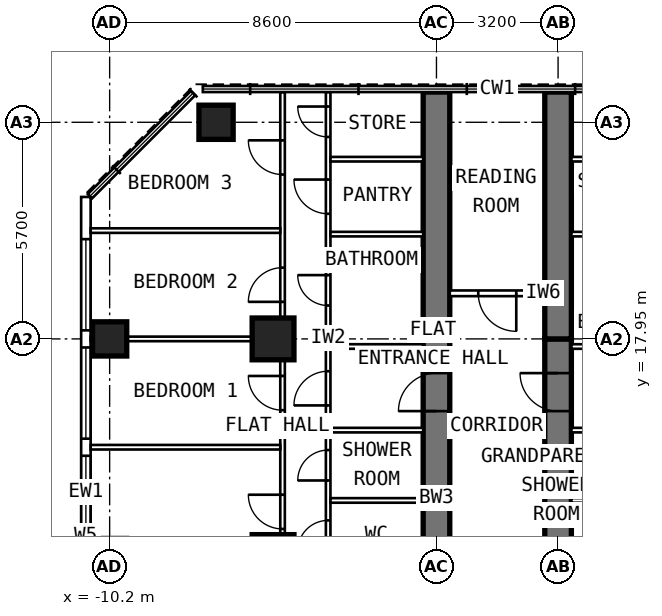
"""IFC4 building model, lengths in metres.
Left out: names, types, materials, properties, quantities, classifications, styles, units other than length and angle.
Written with IfcOpenShell. Run it as: python <this file> out.ifc"""

import sys

from ifc_helpers import new_model, si_unit, direction, frame, frame_2d, origin, origin_2d, place, context, subcontext, project, spatial, rectangle, extrude, element, fill, save


model = new_model("IFC4")
c1 = context("Model", 3, precision=1e-05, world=origin(), true_north=direction((0.0, 1.0)))
c2 = subcontext(c1, "Body", "Model", "MODEL_VIEW")
j1 = project(units=[si_unit("LENGTHUNIT", "METRE"), si_unit("PLANEANGLEUNIT", "RADIAN")], contexts=[c1])
p1 = place(None, origin())
s1 = spatial("IfcSite", under=j1, at=p1, CompositionType="ELEMENT")
p2 = place(p1, origin())
s2 = spatial("IfcBuilding", under=s1, at=p2, CompositionType="ELEMENT")
p3 = place(p2, frame((0.0, 0.0, 201.0)))
s3 = spatial("IfcBuildingStorey", under=s2, at=p3, CompositionType="ELEMENT", Elevation=201.0)
for number, where, z_axis, x_axis in (
    (1, (-10.2, 17.95, 0.0), (0.0, 0.0, 1.0), (0.0, 1.0, 0.0)),
    (2, (-7.4, 23.65, 0.0), (0.0, 0.0, 1.0), (0.0, 1.0, 0.0)),
):
    element("IfcColumn", number, at=place(p3, frame(where, z_axis=z_axis, x_axis=x_axis)), inside=s3, PredefinedType="COLUMN", context=c2, shape_type="SweptSolid", body=[
        extrude(rectangle(XDim=0.9, YDim=0.9, at=origin_2d()), origin(), (0.0, 0.0, 1.0), 3.6),
    ])
for number, where, z_axis, x_axis in (
    (3, (-5.9, 12.25, 0.0), (0.0, 0.0, 1.0), (0.0, 1.0, 0.0)),
    (4, (-5.9, 17.95, 0.0), (0.0, 0.0, 1.0), (0.0, 1.0, 0.0)),
):
    element("IfcColumn", number, at=place(p3, frame(where, z_axis=z_axis, x_axis=x_axis)), inside=s3, PredefinedType="COLUMN", context=c2, shape_type="SweptSolid", body=[
        extrude(rectangle(XDim=1.1, YDim=1.1, at=origin_2d()), origin(), (0.0, 0.0, 1.0), 3.6),
    ])
p4 = place(p3, frame((-1.6, 9.6, 0.0), z_axis=(0.0, 0.0, 1.0), x_axis=(0.0, 1.0, 0.0)))
e5 = element("IfcWall", 5, at=p4, inside=s3, PredefinedType="SHEAR", context=c2, shape_type="SweptSolid", body=[
    extrude(rectangle(XDim=8.35, YDim=0.7, at=frame_2d((4.175, 0.0))), origin(), (0.0, 0.0, 1.0), 3.6),
])
p5 = place(p4, frame((6.45, 0.0, 0.0)))
e6 = element("IfcOpeningElement", 6, at=p5, cuts=e5, PredefinedType="OPENING", context=c2, shape_type="SweptSolid", body=[
    extrude(rectangle(XDim=1.0, YDim=2.1, at=frame_2d((0.5, 1.05))), frame((0.0, 0.362, 0.0), z_axis=(0.0, -1.0, 0.0), x_axis=(1.0, 0.0, 0.0)), (0.0, 0.0, 1.0), 0.724),
])
p6 = place(p3, frame((-1.6, 17.95, 0.0), z_axis=(0.0, 0.0, 1.0), x_axis=(0.0, 1.0, 0.0)))
e7 = element("IfcWall", 7, at=p6, inside=s3, PredefinedType="SHEAR", context=c2, shape_type="SweptSolid", body=[
    extrude(rectangle(XDim=6.495, YDim=0.7, at=frame_2d((3.248, 0.0))), origin(), (0.0, 0.0, 1.0), 3.6),
])
p7 = place(p3, frame((1.6, 9.6, 0.0), z_axis=(0.0, 0.0, 1.0), x_axis=(0.0, 1.0, 0.0)))
e8 = element("IfcWall", 8, at=p7, inside=s3, PredefinedType="SHEAR", context=c2, shape_type="SweptSolid", body=[
    extrude(rectangle(XDim=8.35, YDim=0.7, at=frame_2d((4.175, 0.0))), origin(), (0.0, 0.0, 1.0), 3.6),
])
p8 = place(p7, frame((6.45, 0.0, 0.0)))
e9 = element("IfcOpeningElement", 9, at=p8, cuts=e8, PredefinedType="OPENING", context=c2, shape_type="SweptSolid", body=[
    extrude(rectangle(XDim=1.0, YDim=2.1, at=frame_2d((0.5, 1.05))), frame((0.0, 0.362, 0.0), z_axis=(0.0, -1.0, 0.0), x_axis=(1.0, 0.0, 0.0)), (0.0, 0.0, 1.0), 0.724),
])
p9 = place(p3, frame((1.6, 17.95, 0.0), z_axis=(0.0, 0.0, 1.0), x_axis=(0.0, 1.0, 0.0)))
e10 = element("IfcWall", 10, at=p9, inside=s3, PredefinedType="SHEAR", context=c2, shape_type="SweptSolid", body=[
    extrude(rectangle(XDim=6.495, YDim=0.7, at=frame_2d((3.248, 0.0))), origin(), (0.0, 0.0, 1.0), 3.6),
])
p10 = place(p3, frame((-10.825, 6.148, 0.0), z_axis=(0.0, 0.0, 1.0), x_axis=(0.0, 1.0, 0.0)))
e11 = element("IfcWall", 11, at=p10, inside=s3, PredefinedType="SOLIDWALL", context=c2, shape_type="SweptSolid", body=[
    extrude(rectangle(XDim=15.537, YDim=0.25, at=frame_2d((7.769, 0.0))), origin(), (0.0, 0.0, 1.0), 3.35),
])
p11 = place(p10, frame((0.627, 0.0, 0.8)))
e12 = element("IfcOpeningElement", 12, at=p11, cuts=e11, PredefinedType="OPENING", context=c2, shape_type="SweptSolid", body=[
    extrude(rectangle(XDim=2.4, YDim=1.8, at=frame_2d((1.2, 0.9))), frame((0.0, 0.137, 0.0), z_axis=(0.0, -1.0, 0.0), x_axis=(1.0, 0.0, 0.0)), (0.0, 0.0, 1.0), 0.274),
])
p12 = place(p10, frame((3.477, 0.0, 0.8)))
e13 = element("IfcOpeningElement", 13, at=p12, cuts=e11, PredefinedType="OPENING", context=c2, shape_type="SweptSolid", body=[
    extrude(rectangle(XDim=2.4, YDim=1.8, at=frame_2d((1.2, 0.9))), frame((0.0, 0.137, 0.0), z_axis=(0.0, -1.0, 0.0), x_axis=(1.0, 0.0, 0.0)), (0.0, 0.0, 1.0), 0.274),
])
p13 = place(p10, frame((6.327, 0.0, 0.8)))
e14 = element("IfcOpeningElement", 14, at=p13, cuts=e11, PredefinedType="OPENING", context=c2, shape_type="SweptSolid", body=[
    extrude(rectangle(XDim=2.4, YDim=1.8, at=frame_2d((1.2, 0.9))), frame((0.0, 0.137, 0.0), z_axis=(0.0, -1.0, 0.0), x_axis=(1.0, 0.0, 0.0)), (0.0, 0.0, 1.0), 0.274),
])
p14 = place(p10, frame((9.177, 0.0, 0.8)))
e15 = element("IfcOpeningElement", 15, at=p14, cuts=e11, PredefinedType="OPENING", context=c2, shape_type="SweptSolid", body=[
    extrude(rectangle(XDim=2.4, YDim=1.8, at=frame_2d((1.2, 0.9))), frame((0.0, 0.137, 0.0), z_axis=(0.0, -1.0, 0.0), x_axis=(1.0, 0.0, 0.0)), (0.0, 0.0, 1.0), 0.274),
])
p15 = place(p10, frame((12.027, 0.0, 0.8)))
e16 = element("IfcOpeningElement", 16, at=p15, cuts=e11, PredefinedType="OPENING", context=c2, shape_type="SweptSolid", body=[
    extrude(rectangle(XDim=2.4, YDim=1.8, at=frame_2d((1.2, 0.9))), frame((0.0, 0.137, 0.0), z_axis=(0.0, -1.0, 0.0), x_axis=(1.0, 0.0, 0.0)), (0.0, 0.0, 1.0), 0.274),
])
p16 = place(p3, frame((-4.45, 9.925, 0.0), z_axis=(0.0, 0.0, 1.0), x_axis=(0.0, 1.0, 0.0)))
e17 = element("IfcWall", 17, at=p16, inside=s3, PredefinedType="PARTITIONING", context=c2, shape_type="SweptSolid", body=[
    extrude(rectangle(XDim=14.52, YDim=0.12, at=frame_2d((7.26, 0.0))), origin(), (0.0, 0.0, 1.0), 3.35),
])
p17 = place(p16, frame((0.55, 0.0, 0.0)))
e18 = element("IfcOpeningElement", 18, at=p17, cuts=e17, PredefinedType="OPENING", context=c2, shape_type="SweptSolid", body=[
    extrude(rectangle(XDim=0.9, YDim=2.1, at=frame_2d((0.45, 1.05))), frame((0.0, 0.072, 0.0), z_axis=(0.0, -1.0, 0.0), x_axis=(1.0, 0.0, 0.0)), (0.0, 0.0, 1.0), 0.144),
])
p18 = place(p16, frame((2.45, 0.0, 0.0)))
e19 = element("IfcOpeningElement", 19, at=p18, cuts=e17, PredefinedType="OPENING", context=c2, shape_type="SweptSolid", body=[
    extrude(rectangle(XDim=0.8, YDim=2.1, at=frame_2d((0.4, 1.05))), frame((0.0, 0.072, 0.0), z_axis=(0.0, -1.0, 0.0), x_axis=(1.0, 0.0, 0.0)), (0.0, 0.0, 1.0), 0.144),
])
p19 = place(p16, frame((4.3, 0.0, 0.0)))
e20 = element("IfcOpeningElement", 20, at=p19, cuts=e17, PredefinedType="OPENING", context=c2, shape_type="SweptSolid", body=[
    extrude(rectangle(XDim=0.8, YDim=2.1, at=frame_2d((0.4, 1.05))), frame((0.0, 0.072, 0.0), z_axis=(0.0, -1.0, 0.0), x_axis=(1.0, 0.0, 0.0)), (0.0, 0.0, 1.0), 0.144),
])
p20 = place(p16, frame((6.275, 0.0, 0.0)))
e21 = element("IfcOpeningElement", 21, at=p20, cuts=e17, PredefinedType="OPENING", context=c2, shape_type="SweptSolid", body=[
    extrude(rectangle(XDim=0.9, YDim=2.1, at=frame_2d((0.45, 1.05))), frame((0.0, 0.072, 0.0), z_axis=(0.0, -1.0, 0.0), x_axis=(1.0, 0.0, 0.0)), (0.0, 0.0, 1.0), 0.144),
])
p21 = place(p16, frame((8.904, 0.0, 0.0)))
e22 = element("IfcOpeningElement", 22, at=p21, cuts=e17, PredefinedType="OPENING", context=c2, shape_type="SweptSolid", body=[
    extrude(rectangle(XDim=0.8, YDim=2.1, at=frame_2d((0.4, 1.05))), frame((0.0, 0.072, 0.0), z_axis=(0.0, -1.0, 0.0), x_axis=(1.0, 0.0, 0.0)), (0.0, 0.0, 1.0), 0.144),
])
p22 = place(p16, frame((11.318, 0.0, 0.0)))
e23 = element("IfcOpeningElement", 23, at=p22, cuts=e17, PredefinedType="OPENING", context=c2, shape_type="SweptSolid", body=[
    extrude(rectangle(XDim=0.9, YDim=2.1, at=frame_2d((0.45, 1.05))), frame((0.0, 0.072, 0.0), z_axis=(0.0, -1.0, 0.0), x_axis=(1.0, 0.0, 0.0)), (0.0, 0.0, 1.0), 0.144),
])
p23 = place(p16, frame((13.339, 0.0, 0.0)))
e24 = element("IfcOpeningElement", 24, at=p23, cuts=e17, PredefinedType="OPENING", context=c2, shape_type="SweptSolid", body=[
    extrude(rectangle(XDim=0.8, YDim=2.1, at=frame_2d((0.4, 1.05))), frame((0.0, 0.072, 0.0), z_axis=(0.0, -1.0, 0.0), x_axis=(1.0, 0.0, 0.0)), (0.0, 0.0, 1.0), 0.144),
])
p24 = place(p3, frame((-5.65, 9.6, 0.0), z_axis=(0.0, 0.0, 1.0), x_axis=(0.0, 1.0, 0.0)))
e25 = element("IfcWall", 25, at=p24, inside=s3, PredefinedType="PARTITIONING", context=c2, shape_type="SweptSolid", body=[
    extrude(rectangle(XDim=14.845, YDim=0.12, at=frame_2d((7.422, 0.0))), origin(), (0.0, 0.0, 1.0), 3.35),
])
p25 = place(p24, frame((3.35, 0.0, 0.0)))
e26 = element("IfcOpeningElement", 26, at=p25, cuts=e25, PredefinedType="OPENING", context=c2, shape_type="SweptSolid", body=[
    extrude(rectangle(XDim=0.9, YDim=2.1, at=frame_2d((0.45, 1.05))), frame((0.0, 0.072, 0.0), z_axis=(0.0, -1.0, 0.0), x_axis=(1.0, 0.0, 0.0)), (0.0, 0.0, 1.0), 0.144),
])
p26 = place(p24, frame((6.475, 0.0, 0.0)))
e27 = element("IfcOpeningElement", 27, at=p26, cuts=e25, PredefinedType="OPENING", context=c2, shape_type="SweptSolid", body=[
    extrude(rectangle(XDim=0.9, YDim=2.1, at=frame_2d((0.45, 1.05))), frame((0.0, 0.072, 0.0), z_axis=(0.0, -1.0, 0.0), x_axis=(1.0, 0.0, 0.0)), (0.0, 0.0, 1.0), 0.144),
])
p27 = place(p24, frame((9.325, 0.0, 0.0)))
e28 = element("IfcOpeningElement", 28, at=p27, cuts=e25, PredefinedType="OPENING", context=c2, shape_type="SweptSolid", body=[
    extrude(rectangle(XDim=0.9, YDim=2.1, at=frame_2d((0.45, 1.05))), frame((0.0, 0.072, 0.0), z_axis=(0.0, -1.0, 0.0), x_axis=(1.0, 0.0, 0.0)), (0.0, 0.0, 1.0), 0.144),
])
p28 = place(p24, frame((12.675, 0.0, 0.0)))
e29 = element("IfcOpeningElement", 29, at=p28, cuts=e25, PredefinedType="OPENING", context=c2, shape_type="SweptSolid", body=[
    extrude(rectangle(XDim=0.9, YDim=2.1, at=frame_2d((0.45, 1.05))), frame((0.0, 0.072, 0.0), z_axis=(0.0, -1.0, 0.0), x_axis=(1.0, 0.0, 0.0)), (0.0, 0.0, 1.0), 0.144),
])
p29 = place(p3, frame((-5.71, 15.1, 0.0), z_axis=(0.0, 0.0, 1.0), x_axis=(-1.0, 0.0, 0.0)))
e30 = element("IfcWall", 30, at=p29, inside=s3, PredefinedType="PARTITIONING", context=c2, shape_type="SweptSolid", body=[
    extrude(rectangle(XDim=4.99, YDim=0.12, at=frame_2d((2.495, 0.0))), origin(), (0.0, 0.0, 1.0), 3.35),
])
p30 = place(p3, frame((-5.71, 17.95, 0.0), z_axis=(0.0, 0.0, 1.0), x_axis=(-1.0, 0.0, 0.0)))
e31 = element("IfcWall", 31, at=p30, inside=s3, PredefinedType="PARTITIONING", context=c2, shape_type="SweptSolid", body=[
    extrude(rectangle(XDim=4.99, YDim=0.12, at=frame_2d((2.495, 0.0))), origin(), (0.0, 0.0, 1.0), 2.45),
])
p31 = place(p3, frame((-5.71, 20.8, 0.0), z_axis=(0.0, 0.0, 1.0), x_axis=(-1.0, 0.0, 0.0)))
e32 = element("IfcWall", 32, at=p31, inside=s3, PredefinedType="PARTITIONING", context=c2, shape_type="SweptSolid", body=[
    extrude(rectangle(XDim=4.99, YDim=0.12, at=frame_2d((2.495, 0.0))), origin(), (0.0, 0.0, 1.0), 3.35),
])
for number, where, z_axis, x_axis in (
    (33, (-1.95, 13.7, 0.0), (0.0, 0.0, 1.0), (-1.0, 0.0, 0.0)),
    (34, (-1.95, 15.55, 0.0), (0.0, 0.0, 1.0), (-1.0, 0.0, 0.0)),
):
    element("IfcWall", number, at=place(p3, frame(where, z_axis=z_axis, x_axis=x_axis)), inside=s3, PredefinedType="PARTITIONING", context=c2, shape_type="SweptSolid", body=[
        extrude(rectangle(XDim=2.44, YDim=0.12, at=frame_2d((1.22, 0.0))), origin(), (0.0, 0.0, 1.0), 3.35),
    ])
p32 = place(p3, frame((-1.95, 17.75, 0.0), z_axis=(0.0, 0.0, 1.0), x_axis=(-1.0, 0.0, 0.0)))
e35 = element("IfcWall", 35, at=p32, inside=s3, PredefinedType="PARTITIONING", context=c2, shape_type="SweptSolid", body=[
    extrude(rectangle(XDim=2.44, YDim=0.12, at=frame_2d((1.22, 0.0))), origin(), (0.0, 0.0, 1.0), 2.45),
])
for number, where, z_axis, x_axis in (
    (36, (-1.95, 20.707, 0.0), (0.0, 0.0, 1.0), (-1.0, 0.0, 0.0)),
    (37, (-1.95, 22.678, 0.0), (0.0, 0.0, 1.0), (-1.0, 0.0, 0.0)),
    (38, (1.95, 13.7, 0.0), (0.0, 0.0, 1.0), (1.0, 0.0, 0.0)),
    (39, (1.95, 15.55, 0.0), (0.0, 0.0, 1.0), (1.0, 0.0, 0.0)),
):
    element("IfcWall", number, at=place(p3, frame(where, z_axis=z_axis, x_axis=x_axis)), inside=s3, PredefinedType="PARTITIONING", context=c2, shape_type="SweptSolid", body=[
        extrude(rectangle(XDim=2.44, YDim=0.12, at=frame_2d((1.22, 0.0))), origin(), (0.0, 0.0, 1.0), 3.35),
    ])
p33 = place(p3, frame((1.95, 17.75, 0.0), z_axis=(0.0, 0.0, 1.0), x_axis=(1.0, 0.0, 0.0)))
e40 = element("IfcWall", 40, at=p33, inside=s3, PredefinedType="PARTITIONING", context=c2, shape_type="SweptSolid", body=[
    extrude(rectangle(XDim=2.44, YDim=0.12, at=frame_2d((1.22, 0.0))), origin(), (0.0, 0.0, 1.0), 2.45),
])
for number, where, z_axis, x_axis in (
    (41, (1.95, 20.707, 0.0), (0.0, 0.0, 1.0), (1.0, 0.0, 0.0)),
    (42, (1.95, 22.678, 0.0), (0.0, 0.0, 1.0), (1.0, 0.0, 0.0)),
):
    element("IfcWall", number, at=place(p3, frame(where, z_axis=z_axis, x_axis=x_axis)), inside=s3, PredefinedType="PARTITIONING", context=c2, shape_type="SweptSolid", body=[
        extrude(rectangle(XDim=2.44, YDim=0.12, at=frame_2d((1.22, 0.0))), origin(), (0.0, 0.0, 1.0), 3.35),
    ])
p34 = place(p3, frame((1.25, 19.15, 0.0), z_axis=(0.0, 0.0, 1.0), x_axis=(-1.0, 0.0, 0.0)))
e43 = element("IfcWall", 43, at=p34, inside=s3, PredefinedType="PARTITIONING", context=c2, shape_type="SweptSolid", body=[
    extrude(rectangle(XDim=2.5, YDim=0.15, at=frame_2d((1.25, 0.0))), origin(), (0.0, 0.0, 1.0), 3.35),
])
p35 = place(p34, frame((0.75, 0.0, 0.0)))
e44 = element("IfcOpeningElement", 44, at=p35, cuts=e43, PredefinedType="OPENING", context=c2, shape_type="SweptSolid", body=[
    extrude(rectangle(XDim=1.0, YDim=2.1, at=frame_2d((0.5, 1.05))), frame((0.0, 0.087, 0.0), z_axis=(0.0, -1.0, 0.0), x_axis=(1.0, 0.0, 0.0)), (0.0, 0.0, 1.0), 0.174),
])
p36 = place(p13, origin())
e45 = element("IfcWindow", 45, at=p36, inside=s3, PartitioningType="SINGLE_PANEL", PredefinedType="WINDOW", context=c2, shape_type="SweptSolid", body=[
    extrude(rectangle(XDim=2.4, YDim=1.8, at=frame_2d((1.2, 0.9))), frame((0.0, 0.03, 0.0), z_axis=(0.0, -1.0, 0.0), x_axis=(1.0, 0.0, 0.0)), (0.0, 0.0, 1.0), 0.06),
])
fill(e14, e45)
p37 = place(p14, origin())
e46 = element("IfcWindow", 46, at=p37, inside=s3, PartitioningType="SINGLE_PANEL", PredefinedType="WINDOW", context=c2, shape_type="SweptSolid", body=[
    extrude(rectangle(XDim=2.4, YDim=1.8, at=frame_2d((1.2, 0.9))), frame((0.0, 0.03, 0.0), z_axis=(0.0, -1.0, 0.0), x_axis=(1.0, 0.0, 0.0)), (0.0, 0.0, 1.0), 0.06),
])
fill(e15, e46)
p38 = place(p15, origin())
e47 = element("IfcWindow", 47, at=p38, inside=s3, PartitioningType="SINGLE_PANEL", PredefinedType="WINDOW", context=c2, shape_type="SweptSolid", body=[
    extrude(rectangle(XDim=2.4, YDim=1.8, at=frame_2d((1.2, 0.9))), frame((0.0, 0.03, 0.0), z_axis=(0.0, -1.0, 0.0), x_axis=(1.0, 0.0, 0.0)), (0.0, 0.0, 1.0), 0.06),
])
fill(e16, e47)
p39 = place(p5, origin())
e48 = element("IfcDoor", 48, at=p39, inside=s3, OperationType="SINGLE_SWING_LEFT", PredefinedType="DOOR", context=c2, shape_type="SweptSolid", body=[
    extrude(rectangle(XDim=1.0, YDim=2.1, at=frame_2d((0.5, 1.05))), frame((0.0, 0.1, 0.0), z_axis=(0.0, -1.0, 0.0), x_axis=(1.0, 0.0, 0.0)), (0.0, 0.0, 1.0), 0.2),
])
fill(e6, e48)
p40 = place(p25, origin())
e49 = element("IfcDoor", 49, at=p40, inside=s3, OperationType="SINGLE_SWING_RIGHT", PredefinedType="DOOR", context=c2, shape_type="SweptSolid", body=[
    extrude(rectangle(XDim=0.9, YDim=2.1, at=frame_2d((0.45, 1.05))), frame((0.0, 0.025, 0.0), z_axis=(0.0, -1.0, 0.0), x_axis=(1.0, 0.0, 0.0)), (0.0, 0.0, 1.0), 0.05),
])
fill(e26, e49)
p41 = place(p26, origin())
e50 = element("IfcDoor", 50, at=p41, inside=s3, OperationType="SINGLE_SWING_RIGHT", PredefinedType="DOOR", context=c2, shape_type="SweptSolid", body=[
    extrude(rectangle(XDim=0.9, YDim=2.1, at=frame_2d((0.45, 1.05))), frame((0.0, 0.025, 0.0), z_axis=(0.0, -1.0, 0.0), x_axis=(1.0, 0.0, 0.0)), (0.0, 0.0, 1.0), 0.05),
])
fill(e27, e50)
p42 = place(p27, origin())
e51 = element("IfcDoor", 51, at=p42, inside=s3, OperationType="SINGLE_SWING_LEFT", PredefinedType="DOOR", context=c2, shape_type="SweptSolid", body=[
    extrude(rectangle(XDim=0.9, YDim=2.1, at=frame_2d((0.45, 1.05))), frame((0.0, 0.025, 0.0), z_axis=(0.0, -1.0, 0.0), x_axis=(1.0, 0.0, 0.0)), (0.0, 0.0, 1.0), 0.05),
])
fill(e28, e51)
p43 = place(p28, origin())
e52 = element("IfcDoor", 52, at=p43, inside=s3, OperationType="SINGLE_SWING_RIGHT", PredefinedType="DOOR", context=c2, shape_type="SweptSolid", body=[
    extrude(rectangle(XDim=0.9, YDim=2.1, at=frame_2d((0.45, 1.05))), frame((0.0, 0.025, 0.0), z_axis=(0.0, -1.0, 0.0), x_axis=(1.0, 0.0, 0.0)), (0.0, 0.0, 1.0), 0.05),
])
fill(e29, e52)
p44 = place(p18, origin())
e53 = element("IfcDoor", 53, at=p44, inside=s3, OperationType="SINGLE_SWING_LEFT", PredefinedType="DOOR", context=c2, shape_type="SweptSolid", body=[
    extrude(rectangle(XDim=0.8, YDim=2.1, at=frame_2d((0.4, 1.05))), frame((0.0, 0.025, 0.0), z_axis=(0.0, -1.0, 0.0), x_axis=(1.0, 0.0, 0.0)), (0.0, 0.0, 1.0), 0.05),
])
fill(e19, e53)
p45 = place(p19, origin())
e54 = element("IfcDoor", 54, at=p45, inside=s3, OperationType="SINGLE_SWING_LEFT", PredefinedType="DOOR", context=c2, shape_type="SweptSolid", body=[
    extrude(rectangle(XDim=0.8, YDim=2.1, at=frame_2d((0.4, 1.05))), frame((0.0, 0.025, 0.0), z_axis=(0.0, -1.0, 0.0), x_axis=(1.0, 0.0, 0.0)), (0.0, 0.0, 1.0), 0.05),
])
fill(e20, e54)
p46 = place(p20, origin())
e55 = element("IfcDoor", 55, at=p46, inside=s3, OperationType="SINGLE_SWING_LEFT", PredefinedType="DOOR", context=c2, shape_type="SweptSolid", body=[
    extrude(rectangle(XDim=0.9, YDim=2.1, at=frame_2d((0.45, 1.05))), frame((0.0, 0.025, 0.0), z_axis=(0.0, -1.0, 0.0), x_axis=(1.0, 0.0, 0.0)), (0.0, 0.0, 1.0), 0.05),
])
fill(e21, e55)
p47 = place(p21, origin())
e56 = element("IfcDoor", 56, at=p47, inside=s3, OperationType="SINGLE_SWING_RIGHT", PredefinedType="DOOR", context=c2, shape_type="SweptSolid", body=[
    extrude(rectangle(XDim=0.8, YDim=2.1, at=frame_2d((0.4, 1.05))), frame((0.0, 0.025, 0.0), z_axis=(0.0, -1.0, 0.0), x_axis=(1.0, 0.0, 0.0)), (0.0, 0.0, 1.0), 0.05),
])
fill(e22, e56)
p48 = place(p22, origin())
e57 = element("IfcDoor", 57, at=p48, inside=s3, OperationType="SINGLE_SWING_RIGHT", PredefinedType="DOOR", context=c2, shape_type="SweptSolid", body=[
    extrude(rectangle(XDim=0.9, YDim=2.1, at=frame_2d((0.45, 1.05))), frame((0.0, 0.025, 0.0), z_axis=(0.0, -1.0, 0.0), x_axis=(1.0, 0.0, 0.0)), (0.0, 0.0, 1.0), 0.05),
])
fill(e23, e57)
p49 = place(p23, origin())
e58 = element("IfcDoor", 58, at=p49, inside=s3, OperationType="SINGLE_SWING_RIGHT", PredefinedType="DOOR", context=c2, shape_type="SweptSolid", body=[
    extrude(rectangle(XDim=0.8, YDim=2.1, at=frame_2d((0.4, 1.05))), frame((0.0, 0.025, 0.0), z_axis=(0.0, -1.0, 0.0), x_axis=(1.0, 0.0, 0.0)), (0.0, 0.0, 1.0), 0.05),
])
fill(e24, e58)
p50 = place(p8, origin())
e59 = element("IfcDoor", 59, at=p50, inside=s3, OperationType="SINGLE_SWING_RIGHT", PredefinedType="DOOR", context=c2, shape_type="SweptSolid", body=[
    extrude(rectangle(XDim=1.0, YDim=2.1, at=frame_2d((0.5, 1.05))), frame((0.0, 0.1, 0.0), z_axis=(0.0, -1.0, 0.0), x_axis=(1.0, 0.0, 0.0)), (0.0, 0.0, 1.0), 0.2),
])
fill(e9, e59)
p51 = place(p35, origin())
e60 = element("IfcDoor", 60, at=p51, inside=s3, OperationType="SINGLE_SWING_LEFT", PredefinedType="DOOR", context=c2, shape_type="SweptSolid", body=[
    extrude(rectangle(XDim=1.0, YDim=2.1, at=frame_2d((0.5, 1.05))), frame((0.0, 0.025, 0.0), z_axis=(0.0, -1.0, 0.0), x_axis=(1.0, 0.0, 0.0)), (0.0, 0.0, 1.0), 0.05),
])
fill(e44, e60)
save(model, sys.argv[1])
